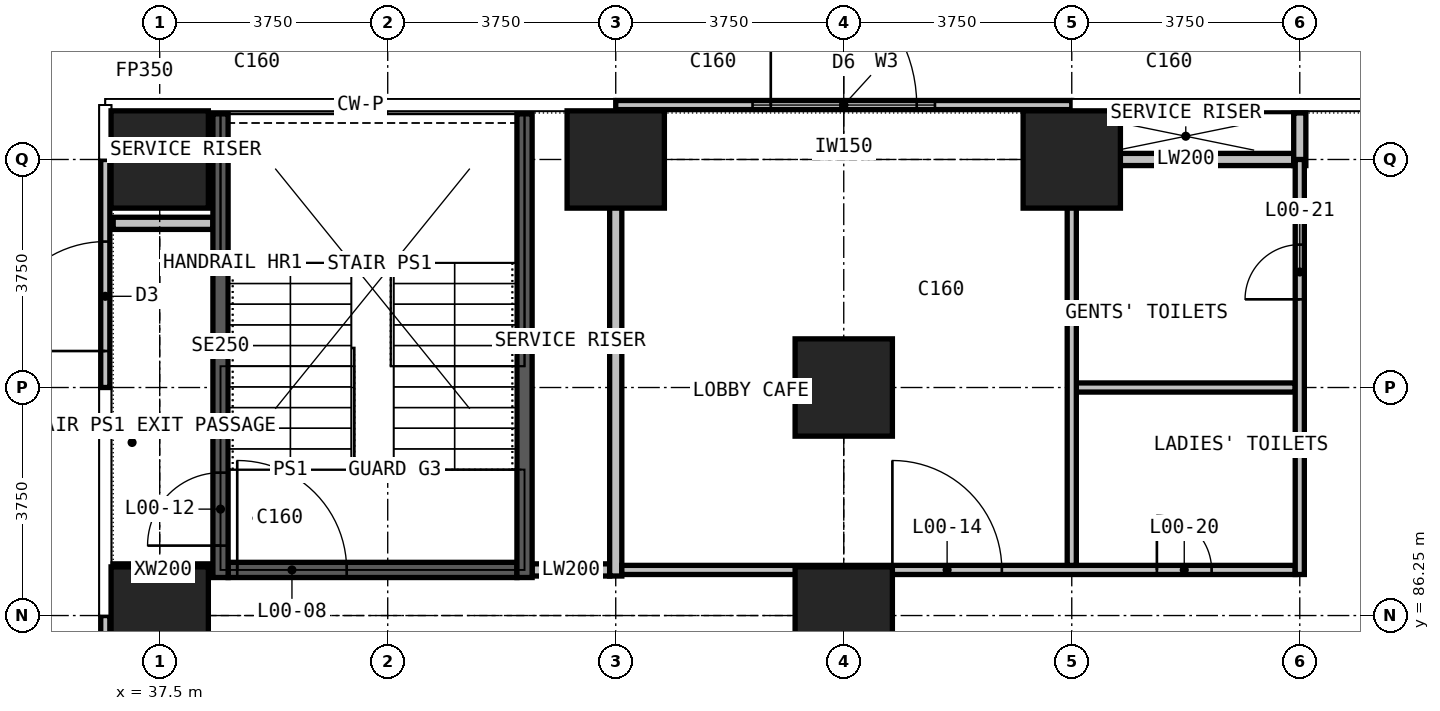
"""IFC4 building model, lengths in metres.
Left out: names, types, materials, properties, quantities, classifications, styles, units other than length and angle.
Written with IfcOpenShell. Run it as: python <this file> out.ifc"""

import sys

from ifc_helpers import new_model, si_unit, direction, frame, frame_2d, origin, origin_2d, place, context, subcontext, project, spatial, rectangle, extrude, element, fill, save


model = new_model("IFC4")
c1 = context("Model", 3, precision=1e-05, world=origin(), true_north=direction((0.0, 1.0)))
c2 = subcontext(c1, "Body", "Model", "MODEL_VIEW")
j1 = project(units=[si_unit("LENGTHUNIT", "METRE"), si_unit("PLANEANGLEUNIT", "RADIAN")], contexts=[c1])
p1 = place(None, origin())
s1 = spatial("IfcSite", under=j1, at=p1, CompositionType="ELEMENT")
p2 = place(p1, origin())
s2 = spatial("IfcBuilding", under=s1, at=p2, CompositionType="ELEMENT")
p3 = place(p2, origin())
s3 = spatial("IfcBuildingStorey", under=s2, at=p3, CompositionType="ELEMENT", Elevation=0.0)
for number, where, z_axis, x_axis in (
    (1, (37.5, 86.25, 0.0), (0.0, 0.0, 1.0), (1.0, 0.0, 0.0)),
    (2, (37.5, 93.75, 0.0), (0.0, 0.0, 1.0), (1.0, 0.0, 0.0)),
    (3, (45.0, 93.75, 0.0), (0.0, 0.0, 1.0), (1.0, 0.0, 0.0)),
    (4, (48.75, 86.25, 0.0), (0.0, 0.0, 1.0), (1.0, 0.0, 0.0)),
    (5, (48.75, 90.0, 0.0), (0.0, 0.0, 1.0), (1.0, 0.0, 0.0)),
    (6, (52.5, 93.75, 0.0), (0.0, 0.0, 1.0), (1.0, 0.0, 0.0)),
):
    element("IfcColumn", number, at=place(p3, frame(where, z_axis=z_axis, x_axis=x_axis)), inside=s3, PredefinedType="COLUMN", context=c2, shape_type="SweptSolid", body=[
        extrude(rectangle(XDim=1.6, YDim=1.6, at=origin_2d()), origin(), (0.0, 0.0, 1.0), 7.5),
    ])
p4 = place(p3, frame((45.0, 94.645, 0.0), z_axis=(0.0, 0.0, 1.0), x_axis=(1.0, 0.0, 0.0)))
e7 = element("IfcWall", 7, at=p4, inside=s3, PredefinedType="SOLIDWALL", context=c2, shape_type="SweptSolid", body=[
    extrude(rectangle(XDim=7.5, YDim=0.15, at=frame_2d((3.75, 0.0))), origin(), (0.0, 0.0, 1.0), 7.15),
])
p5 = place(p4, frame((2.55, 0.0, 0.0)))
e8 = element("IfcOpeningElement", 8, at=p5, cuts=e7, PredefinedType="OPENING", context=c2, shape_type="SweptSolid", body=[
    extrude(rectangle(XDim=2.4, YDim=2.7, at=frame_2d((1.2, 1.35))), frame((0.0, 0.085, 0.0), z_axis=(0.0, -1.0, 0.0), x_axis=(1.0, 0.0, 0.0)), (0.0, 0.0, 1.0), 0.17),
])
p6 = place(p4, frame((2.25, 0.0, 3.0)))
e9 = element("IfcOpeningElement", 9, at=p6, cuts=e7, PredefinedType="OPENING", context=c2, shape_type="SweptSolid", body=[
    extrude(rectangle(XDim=3.0, YDim=3.6, at=frame_2d((1.5, 1.8))), frame((0.0, 0.085, 0.0), z_axis=(0.0, -1.0, 0.0), x_axis=(1.0, 0.0, 0.0)), (0.0, 0.0, 1.0), 0.17),
])
p7 = place(p3, frame((36.605, 82.5, 0.0), z_axis=(0.0, 0.0, 1.0), x_axis=(0.0, 1.0, 0.0)))
e10 = element("IfcWall", 10, at=p7, inside=s3, PredefinedType="SOLIDWALL", context=c2, shape_type="SweptSolid", body=[
    extrude(rectangle(XDim=3.75, YDim=0.15, at=frame_2d((1.875, 0.0))), origin(), (0.0, 0.0, 1.0), 7.15),
])
p8 = place(p7, frame((0.5, 0.0, 0.0)))
e11 = element("IfcOpeningElement", 11, at=p8, cuts=e10, PredefinedType="OPENING", context=c2, shape_type="SweptSolid", body=[
    extrude(rectangle(XDim=2.4, YDim=2.7, at=frame_2d((1.2, 1.35))), frame((0.0, 0.085, 0.0), z_axis=(0.0, -1.0, 0.0), x_axis=(1.0, 0.0, 0.0)), (0.0, 0.0, 1.0), 0.17),
])
p9 = place(p7, frame((0.2, 0.0, 3.0)))
e12 = element("IfcOpeningElement", 12, at=p9, cuts=e10, PredefinedType="OPENING", context=c2, shape_type="SweptSolid", body=[
    extrude(rectangle(XDim=3.0, YDim=3.6, at=frame_2d((1.5, 1.8))), frame((0.0, 0.085, 0.0), z_axis=(0.0, -1.0, 0.0), x_axis=(1.0, 0.0, 0.0)), (0.0, 0.0, 1.0), 0.17),
])
p10 = place(p3, frame((36.605, 90.0, 0.0), z_axis=(0.0, 0.0, 1.0), x_axis=(0.0, 1.0, 0.0)))
e13 = element("IfcWall", 13, at=p10, inside=s3, PredefinedType="SOLIDWALL", context=c2, shape_type="SweptSolid", body=[
    extrude(rectangle(XDim=3.75, YDim=0.15, at=frame_2d((1.875, 0.0))), origin(), (0.0, 0.0, 1.0), 7.15),
])
p11 = place(p10, frame((0.6, 0.0, 0.0)))
e14 = element("IfcOpeningElement", 14, at=p11, cuts=e13, PredefinedType="OPENING", context=c2, shape_type="SweptSolid", body=[
    extrude(rectangle(XDim=1.8, YDim=2.4, at=frame_2d((0.9, 1.2))), frame((0.0, 0.085, 0.0), z_axis=(0.0, -1.0, 0.0), x_axis=(1.0, 0.0, 0.0)), (0.0, 0.0, 1.0), 0.17),
])
p12 = place(p3, frame((43.625, 87.0, 0.0), z_axis=(0.0, 0.0, 1.0), x_axis=(1.0, 0.0, 0.0)))
e15 = element("IfcWall", 15, at=p12, inside=s3, PredefinedType="PARTITIONING", context=c2, shape_type="SweptSolid", body=[
    extrude(rectangle(XDim=1.275, YDim=0.2, at=frame_2d((0.637, 0.0))), origin(), (0.0, 0.0, 1.0), 7.15),
])
p13 = place(p3, frame((52.6, 93.75, 0.0), z_axis=(0.0, 0.0, 1.0), x_axis=(1.0, 0.0, 0.0)))
e16 = element("IfcWall", 16, at=p13, inside=s3, PredefinedType="PARTITIONING", context=c2, shape_type="SweptSolid", body=[
    extrude(rectangle(XDim=3.55, YDim=0.2, at=frame_2d((1.775, 0.0))), origin(), (0.0, 0.0, 1.0), 7.15),
])
p14 = place(p3, frame((45.0, 86.9, 0.0), z_axis=(0.0, 0.0, 1.0), x_axis=(0.0, 1.0, 0.0)))
e17 = element("IfcWall", 17, at=p14, inside=s3, PredefinedType="PARTITIONING", context=c2, shape_type="SweptSolid", body=[
    extrude(rectangle(XDim=7.615, YDim=0.2, at=frame_2d((3.808, 0.0))), origin(), (0.0, 0.0, 1.0), 7.15),
])
for number, where, z_axis, x_axis in (
    (18, (52.5, 93.65, 0.0), (0.0, 0.0, 1.0), (0.0, 1.0, 0.0)),
    (19, (56.25, 93.65, 0.0), (0.0, 0.0, 1.0), (0.0, 1.0, 0.0)),
):
    element("IfcWall", number, at=place(p3, frame(where, z_axis=z_axis, x_axis=x_axis)), inside=s3, PredefinedType="PARTITIONING", context=c2, shape_type="SweptSolid", body=[
        extrude(rectangle(XDim=0.865, YDim=0.2, at=frame_2d((0.433, 0.0))), origin(), (0.0, 0.0, 1.0), 7.15),
    ])
for number, where, z_axis, x_axis in (
    (20, (36.735, 87.0, 0.0), (0.0, 0.0, 1.0), (1.0, 0.0, 0.0)),
    (21, (36.735, 92.7, 0.0), (0.0, 0.0, 1.0), (1.0, 0.0, 0.0)),
):
    element("IfcWall", number, at=place(p3, frame(where, z_axis=z_axis, x_axis=x_axis)), inside=s3, PredefinedType="PARTITIONING", context=c2, shape_type="SweptSolid", body=[
        extrude(rectangle(XDim=1.64, YDim=0.2, at=frame_2d((0.82, 0.0))), origin(), (0.0, 0.0, 1.0), 7.15),
    ])
p15 = place(p3, frame((45.1, 87.0, 0.0), z_axis=(0.0, 0.0, 1.0), x_axis=(1.0, 0.0, 0.0)))
e22 = element("IfcWall", 22, at=p15, inside=s3, PredefinedType="PARTITIONING", context=c2, shape_type="SweptSolid", body=[
    extrude(rectangle(XDim=11.075, YDim=0.15, at=frame_2d((5.538, 0.0))), origin(), (0.0, 0.0, 1.0), 7.15),
])
p16 = place(p15, frame((4.45, 0.0, 0.0)))
e23 = element("IfcOpeningElement", 23, at=p16, cuts=e22, PredefinedType="OPENING", context=c2, shape_type="SweptSolid", body=[
    extrude(rectangle(XDim=1.8, YDim=2.2, at=frame_2d((0.9, 1.1))), frame((0.0, 0.085, 0.0), z_axis=(0.0, -1.0, 0.0), x_axis=(1.0, 0.0, 0.0)), (0.0, 0.0, 1.0), 0.17),
])
p17 = place(p15, frame((8.8, 0.0, 0.0)))
e24 = element("IfcOpeningElement", 24, at=p17, cuts=e22, PredefinedType="OPENING", context=c2, shape_type="SweptSolid", body=[
    extrude(rectangle(XDim=0.9, YDim=2.2, at=frame_2d((0.45, 1.1))), frame((0.0, 0.085, 0.0), z_axis=(0.0, -1.0, 0.0), x_axis=(1.0, 0.0, 0.0)), (0.0, 0.0, 1.0), 0.17),
])
p18 = place(p3, frame((52.575, 90.0, 0.0), z_axis=(0.0, 0.0, 1.0), x_axis=(1.0, 0.0, 0.0)))
e25 = element("IfcWall", 25, at=p18, inside=s3, PredefinedType="PARTITIONING", context=c2, shape_type="SweptSolid", body=[
    extrude(rectangle(XDim=3.6, YDim=0.15, at=frame_2d((1.8, 0.0))), origin(), (0.0, 0.0, 1.0), 7.15),
])
p19 = place(p3, frame((52.5, 87.075, 0.0), z_axis=(0.0, 0.0, 1.0), x_axis=(0.0, 1.0, 0.0)))
e26 = element("IfcWall", 26, at=p19, inside=s3, PredefinedType="PARTITIONING", context=c2, shape_type="SweptSolid", body=[
    extrude(rectangle(XDim=6.675, YDim=0.15, at=frame_2d((3.337, 0.0))), origin(), (0.0, 0.0, 1.0), 7.15),
])
p20 = place(p3, frame((56.25, 86.925, 0.0), z_axis=(0.0, 0.0, 1.0), x_axis=(0.0, 1.0, 0.0)))
e27 = element("IfcWall", 27, at=p20, inside=s3, PredefinedType="PARTITIONING", context=c2, shape_type="SweptSolid", body=[
    extrude(rectangle(XDim=6.825, YDim=0.15, at=frame_2d((3.413, 0.0))), origin(), (0.0, 0.0, 1.0), 7.15),
])
p21 = place(p20, frame((4.525, 0.0, 0.0)))
e28 = element("IfcOpeningElement", 28, at=p21, cuts=e27, PredefinedType="OPENING", context=c2, shape_type="SweptSolid", body=[
    extrude(rectangle(XDim=0.9, YDim=2.2, at=frame_2d((0.45, 1.1))), frame((0.0, 0.085, 0.0), z_axis=(0.0, -1.0, 0.0), x_axis=(1.0, 0.0, 0.0)), (0.0, 0.0, 1.0), 0.17),
])
p22 = place(p3, frame((38.625, 87.0, 0.0), z_axis=(0.0, 0.0, 1.0), x_axis=(1.0, 0.0, 0.0)))
e29 = element("IfcWall", 29, at=p22, inside=s3, PredefinedType="PARTITIONING", context=c2, shape_type="SweptSolid", body=[
    extrude(rectangle(XDim=4.75, YDim=0.25, at=frame_2d((2.375, 0.0))), origin(), (0.0, 0.0, 1.0), 7.15),
])
p23 = place(p22, frame((0.15, 0.0, 0.0)))
e30 = element("IfcOpeningElement", 30, at=p23, cuts=e29, PredefinedType="OPENING", context=c2, shape_type="SweptSolid", body=[
    extrude(rectangle(XDim=1.8, YDim=2.2, at=frame_2d((0.9, 1.1))), frame((0.0, 0.135, 0.0), z_axis=(0.0, -1.0, 0.0), x_axis=(1.0, 0.0, 0.0)), (0.0, 0.0, 1.0), 0.27),
])
p24 = place(p3, frame((38.5, 86.875, 0.0), z_axis=(0.0, 0.0, 1.0), x_axis=(0.0, 1.0, 0.0)))
e31 = element("IfcWall", 31, at=p24, inside=s3, PredefinedType="PARTITIONING", context=c2, shape_type="SweptSolid", body=[
    extrude(rectangle(XDim=7.625, YDim=0.25, at=frame_2d((3.812, 0.0))), origin(), (0.0, 0.0, 1.0), 7.15),
])
p25 = place(p24, frame((0.525, 0.0, 0.0)))
e32 = element("IfcOpeningElement", 32, at=p25, cuts=e31, PredefinedType="OPENING", context=c2, shape_type="SweptSolid", body=[
    extrude(rectangle(XDim=1.2, YDim=2.2, at=frame_2d((0.6, 1.1))), frame((0.0, 0.135, 0.0), z_axis=(0.0, -1.0, 0.0), x_axis=(1.0, 0.0, 0.0)), (0.0, 0.0, 1.0), 0.27),
])
p26 = place(p3, frame((43.5, 86.875, 0.0), z_axis=(0.0, 0.0, 1.0), x_axis=(0.0, 1.0, 0.0)))
e33 = element("IfcWall", 33, at=p26, inside=s3, PredefinedType="PARTITIONING", context=c2, shape_type="SweptSolid", body=[
    extrude(rectangle(XDim=7.625, YDim=0.25, at=frame_2d((3.812, 0.0))), origin(), (0.0, 0.0, 1.0), 7.15),
])
p27 = place(p5, origin())
e34 = element("IfcDoor", 34, at=p27, inside=s3, OperationType="DOUBLE_DOOR_SINGLE_SWING", PredefinedType="DOOR", context=c2, shape_type="SweptSolid", body=[
    extrude(rectangle(XDim=2.4, YDim=2.7, at=frame_2d((1.2, 1.35))), frame((0.0, 0.025, 0.0), z_axis=(0.0, -1.0, 0.0), x_axis=(1.0, 0.0, 0.0)), (0.0, 0.0, 1.0), 0.05),
])
fill(e8, e34)
p28 = place(p6, origin())
e35 = element("IfcWindow", 35, at=p28, inside=s3, PartitioningType="SINGLE_PANEL", PredefinedType="WINDOW", context=c2, shape_type="SweptSolid", body=[
    extrude(rectangle(XDim=3.0, YDim=3.6, at=frame_2d((1.5, 1.8))), frame((0.0, 0.03, 0.0), z_axis=(0.0, -1.0, 0.0), x_axis=(1.0, 0.0, 0.0)), (0.0, 0.0, 1.0), 0.06),
])
fill(e9, e35)
p29 = place(p11, origin())
e36 = element("IfcDoor", 36, at=p29, inside=s3, OperationType="DOUBLE_DOOR_SINGLE_SWING", PredefinedType="DOOR", context=c2, shape_type="SweptSolid", body=[
    extrude(rectangle(XDim=1.8, YDim=2.4, at=frame_2d((0.9, 1.2))), frame((0.0, 0.025, 0.0), z_axis=(0.0, -1.0, 0.0), x_axis=(1.0, 0.0, 0.0)), (0.0, 0.0, 1.0), 0.05),
])
fill(e14, e36)
p30 = place(p23, origin())
e37 = element("IfcDoor", 37, at=p30, inside=s3, OperationType="DOUBLE_DOOR_SINGLE_SWING", PredefinedType="DOOR", context=c2, shape_type="SweptSolid", body=[
    extrude(rectangle(XDim=1.8, YDim=2.2, at=frame_2d((0.9, 1.1))), frame((0.0, 0.025, 0.0), z_axis=(0.0, -1.0, 0.0), x_axis=(1.0, 0.0, 0.0)), (0.0, 0.0, 1.0), 0.05),
])
fill(e30, e37)
p31 = place(p25, origin())
e38 = element("IfcDoor", 38, at=p31, inside=s3, OperationType="SINGLE_SWING_RIGHT", PredefinedType="DOOR", context=c2, shape_type="SweptSolid", body=[
    extrude(rectangle(XDim=1.2, YDim=2.2, at=frame_2d((0.6, 1.1))), frame((0.0, 0.025, 0.0), z_axis=(0.0, -1.0, 0.0), x_axis=(1.0, 0.0, 0.0)), (0.0, 0.0, 1.0), 0.05),
])
fill(e32, e38)
p32 = place(p16, origin())
e39 = element("IfcDoor", 39, at=p32, inside=s3, OperationType="DOUBLE_DOOR_SINGLE_SWING", PredefinedType="DOOR", context=c2, shape_type="SweptSolid", body=[
    extrude(rectangle(XDim=1.8, YDim=2.2, at=frame_2d((0.9, 1.1))), frame((0.0, 0.025, 0.0), z_axis=(0.0, -1.0, 0.0), x_axis=(1.0, 0.0, 0.0)), (0.0, 0.0, 1.0), 0.05),
])
fill(e23, e39)
p33 = place(p17, origin())
e40 = element("IfcDoor", 40, at=p33, inside=s3, OperationType="SINGLE_SWING_RIGHT", PredefinedType="DOOR", context=c2, shape_type="SweptSolid", body=[
    extrude(rectangle(XDim=0.9, YDim=2.2, at=frame_2d((0.45, 1.1))), frame((0.0, 0.025, 0.0), z_axis=(0.0, -1.0, 0.0), x_axis=(1.0, 0.0, 0.0)), (0.0, 0.0, 1.0), 0.05),
])
fill(e24, e40)
p34 = place(p21, origin())
e41 = element("IfcDoor", 41, at=p34, inside=s3, OperationType="SINGLE_SWING_LEFT", PredefinedType="DOOR", context=c2, shape_type="SweptSolid", body=[
    extrude(rectangle(XDim=0.9, YDim=2.2, at=frame_2d((0.45, 1.1))), frame((0.0, 0.025, 0.0), z_axis=(0.0, -1.0, 0.0), x_axis=(1.0, 0.0, 0.0)), (0.0, 0.0, 1.0), 0.05),
])
fill(e28, e41)
save(model, sys.argv[1])
